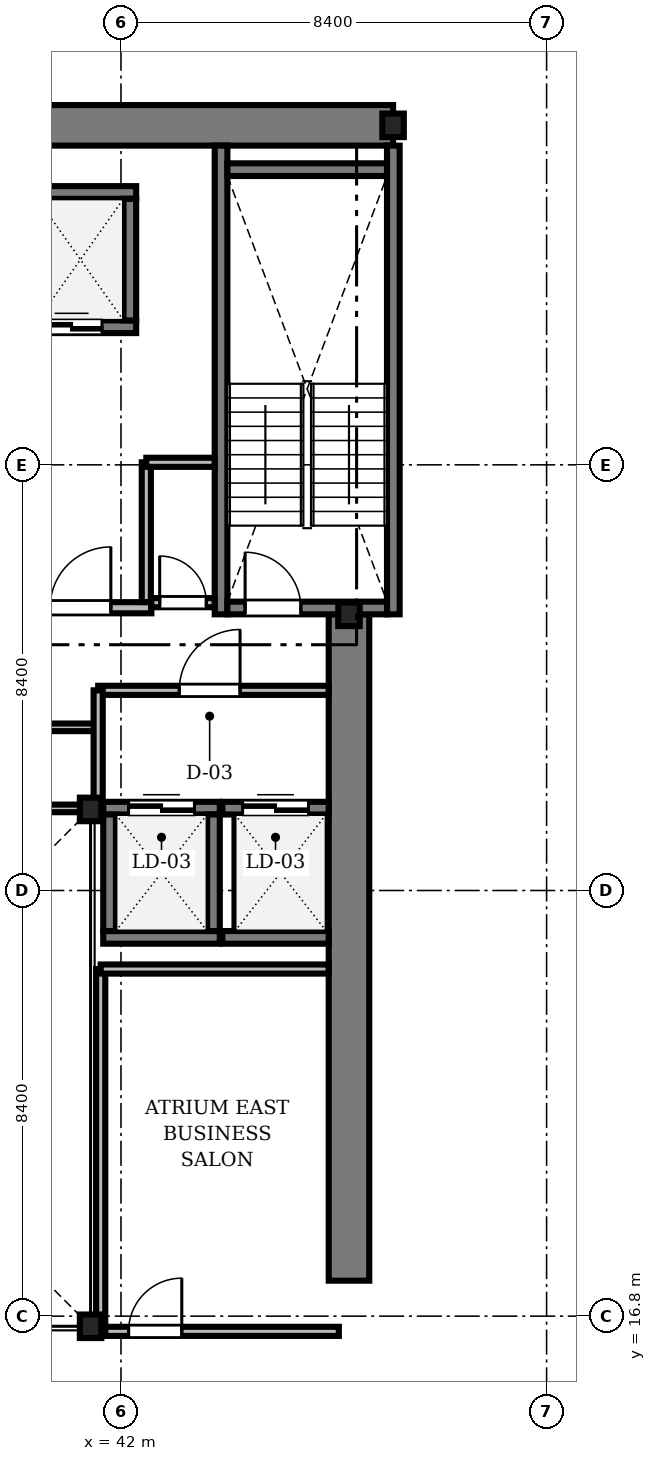
"""IFC4 building model, lengths in metres.
Left out: names, types, materials, properties, quantities, classifications, styles, units other than length and angle.
Written with IfcOpenShell. Run it as: python <this file> out.ifc"""

import sys

from ifc_helpers import new_model, si_unit, direction, frame, frame_2d, origin, origin_2d, place, context, subcontext, project, spatial, rectangle, i_section, extrude, source, transform, mapped, element, fill, save


model = new_model("IFC4")
c1 = context("Model", 3, precision=1e-05, world=origin(), true_north=direction((0.0, 1.0)))
c2 = subcontext(c1, "Body", "Model", "MODEL_VIEW")
j1 = project(units=[si_unit("LENGTHUNIT", "METRE"), si_unit("PLANEANGLEUNIT", "RADIAN")], contexts=[c1])
p1 = place(None, origin())
s1 = spatial("IfcSite", under=j1, at=p1, CompositionType="ELEMENT")
p2 = place(p1, origin())
s2 = spatial("IfcBuilding", under=s1, at=p2, CompositionType="ELEMENT")
p3 = place(p2, frame((0.0, 0.0, 140.9)))
s3 = spatial("IfcBuildingStorey", under=s2, at=p3, CompositionType="ELEMENT", Elevation=140.9)
m1 = source(origin(), c2, "Body", "SweptSolid", [
    extrude(rectangle(XDim=17.52, YDim=0.8, at=frame_2d((8.76, 0.0))), origin(), (0.0, 0.0, 1.0), 3.46),
])
p4 = place(p3, frame((29.85, 40.3, 0.0), z_axis=(0.0, 0.0, 1.0), x_axis=(1.0, 0.0, 0.0)))
e1 = element("IfcWall", 1, at=p4, inside=s3, PredefinedType="SHEAR", context=c2, shape_type="MappedRepresentation", body=[
    mapped(m1, transform((0.0, 0.0, 0.0), scale=1.0)),
])
m2 = source(origin(), c2, "Body", "SweptSolid", [
    extrude(rectangle(XDim=13.15, YDim=0.8, at=frame_2d((6.575, 0.0))), origin(), (0.0, 0.0, 1.0), 3.46),
])
p5 = place(p3, frame((46.5, 17.5, 0.0), z_axis=(0.0, 0.0, 1.0), x_axis=(0.0, 1.0, 0.0)))
e2 = element("IfcWall", 2, at=p5, inside=s3, PredefinedType="SHEAR", context=c2, shape_type="MappedRepresentation", body=[
    mapped(m2, transform((0.0, 0.0, 0.0), scale=1.0)),
])
m3 = source(origin(), c2, "Body", "SweptSolid", [
    extrude(i_section(OverallWidth=0.424, OverallDepth=0.465, WebThickness=0.035, FlangeThickness=0.056, FilletRadius=0.015, at=origin_2d()), origin(), (0.0, 0.0, 1.0), 3.46),
])
for number, where, z_axis, x_axis in (
    (3, (41.4, 16.6, 0.0), (0.0, 0.0, 1.0), (1.0, 0.0, 0.0)),
    (4, (41.4, 26.8, 0.0), (0.0, 0.0, 1.0), (1.0, 0.0, 0.0)),
    (5, (46.5, 30.65, 0.0), (0.0, 0.0, 1.0), (1.0, 0.0, 0.0)),
    (6, (47.37, 40.3, 0.0), (0.0, 0.0, 1.0), (1.0, 0.0, 0.0)),
):
    element("IfcColumn", number, at=place(p3, frame(where, z_axis=z_axis, x_axis=x_axis)), inside=s3, PredefinedType="COLUMN", context=c2, shape_type="MappedRepresentation", body=[
        mapped(m3, transform((0.0, 0.0, 0.0), scale=1.0)),
    ])
m4 = source(origin(), c2, "Body", "SweptSolid", [
    extrude(rectangle(XDim=9.25, YDim=0.25, at=frame_2d((4.625, 0.0))), origin(), (0.0, 0.0, 1.0), 3.5),
])
for number, where, z_axis, x_axis in (
    (7, (43.975, 30.65, 0.0), (0.0, 0.0, 1.0), (0.0, 1.0, 0.0)),
    (8, (47.375, 30.65, 0.0), (0.0, 0.0, 1.0), (0.0, 1.0, 0.0)),
):
    element("IfcWall", number, at=place(p3, frame(where, z_axis=z_axis, x_axis=x_axis)), inside=s3, PredefinedType="SOLIDWALL", context=c2, shape_type="MappedRepresentation", body=[
        mapped(m4, transform((0.0, 0.0, 0.0), scale=1.0)),
    ])
m5 = source(origin(), c2, "Body", "SweptSolid", [
    extrude(rectangle(XDim=3.15, YDim=0.25, at=frame_2d((1.575, 0.0))), origin(), (0.0, 0.0, 1.0), 3.5),
])
p6 = place(p3, frame((44.1, 39.425, 0.0), z_axis=(0.0, 0.0, 1.0), x_axis=(1.0, 0.0, 0.0)))
e9 = element("IfcWall", 9, at=p6, inside=s3, PredefinedType="SOLIDWALL", context=c2, shape_type="MappedRepresentation", body=[
    mapped(m5, transform((0.0, 0.0, 0.0), scale=1.0)),
])
p7 = place(p3, frame((44.1, 30.775, 0.0), z_axis=(0.0, 0.0, 1.0), x_axis=(1.0, 0.0, 0.0)))
e10 = element("IfcWall", 10, at=p7, inside=s3, PredefinedType="SOLIDWALL", context=c2, shape_type="MappedRepresentation", body=[
    mapped(m5, transform((0.0, 0.0, 0.0), scale=1.0)),
])
m6 = source(origin(), c2, "Body", "SweptSolid", [
    extrude(rectangle(XDim=1.1, YDim=2.2, at=frame_2d((0.55, 1.1))), frame((0.0, 0.135, 0.0), z_axis=(0.0, -1.0, 0.0), x_axis=(1.0, 0.0, 0.0)), (0.0, 0.0, 1.0), 0.27),
])
p8 = place(p7, frame((0.35, 0.0, 0.0)))
e11 = element("IfcOpeningElement", 11, at=p8, cuts=e10, PredefinedType="OPENING", context=c2, shape_type="MappedRepresentation", body=[
    mapped(m6, transform((0.0, 0.0, 0.0), scale=1.0)),
])
m7 = source(origin(), c2, "Body", "SweptSolid", [
    extrude(rectangle(XDim=2.8, YDim=0.22, at=frame_2d((1.4, 0.0))), origin(), (0.0, 0.0, 1.0), 3.46),
])
p9 = place(p3, frame((39.8, 30.78, 0.0), z_axis=(0.0, 0.0, 1.0), x_axis=(1.0, 0.0, 0.0)))
e12 = element("IfcWall", 12, at=p9, inside=s3, PredefinedType="SOLIDWALL", context=c2, shape_type="MappedRepresentation", body=[
    mapped(m7, transform((0.0, 0.0, 0.0), scale=1.0)),
])
m8 = source(origin(), c2, "Body", "SweptSolid", [
    extrude(rectangle(XDim=1.2, YDim=2.2, at=frame_2d((0.6, 1.1))), frame((0.0, 0.12, 0.0), z_axis=(0.0, -1.0, 0.0), x_axis=(1.0, 0.0, 0.0)), (0.0, 0.0, 1.0), 0.24),
])
p10 = place(p9, frame((0.8, 0.0, 0.0)))
e13 = element("IfcOpeningElement", 13, at=p10, cuts=e12, PredefinedType="OPENING", context=c2, shape_type="MappedRepresentation", body=[
    mapped(m8, transform((0.0, 0.0, 0.0), scale=1.0)),
])
m9 = source(origin(), c2, "Body", "SweptSolid", [
    extrude(rectangle(XDim=2.55, YDim=0.25, at=frame_2d((1.275, 0.0))), origin(), (0.0, 0.0, 1.0), 3.46),
])
p11 = place(p3, frame((39.75, 36.325, 0.0), z_axis=(0.0, 0.0, 1.0), x_axis=(1.0, 0.0, 0.0)))
e14 = element("IfcWall", 14, at=p11, inside=s3, PredefinedType="SOLIDWALL", context=c2, shape_type="MappedRepresentation", body=[
    mapped(m9, transform((0.0, 0.0, 0.0), scale=1.0)),
])
m10 = source(origin(), c2, "Body", "SweptSolid", [
    extrude(rectangle(XDim=1.2, YDim=2.25, at=frame_2d((0.6, 1.125))), frame((0.0, 0.135, 0.0), z_axis=(0.0, -1.0, 0.0), x_axis=(1.0, 0.0, 0.0)), (0.0, 0.0, 1.0), 0.27),
])
p12 = place(p11, frame((0.675, 0.0, 0.0)))
e15 = element("IfcOpeningElement", 15, at=p12, cuts=e14, PredefinedType="OPENING", context=c2, shape_type="MappedRepresentation", body=[
    mapped(m10, transform((0.0, 0.0, 0.0), scale=1.0)),
])
p13 = place(p3, frame((39.75, 38.975, 0.0), z_axis=(0.0, 0.0, 1.0), x_axis=(1.0, 0.0, 0.0)))
e16 = element("IfcWall", 16, at=p13, inside=s3, PredefinedType="SOLIDWALL", context=c2, shape_type="MappedRepresentation", body=[
    mapped(m9, transform((0.0, 0.0, 0.0), scale=1.0)),
])
m11 = source(origin(), c2, "Body", "SweptSolid", [
    extrude(rectangle(XDim=2.4, YDim=0.25, at=frame_2d((1.2, 0.0))), origin(), (0.0, 0.0, 1.0), 3.46),
])
p14 = place(p3, frame((42.175, 36.45, 0.0), z_axis=(0.0, 0.0, 1.0), x_axis=(0.0, 1.0, 0.0)))
e17 = element("IfcWall", 17, at=p14, inside=s3, PredefinedType="SOLIDWALL", context=c2, shape_type="MappedRepresentation", body=[
    mapped(m11, transform((0.0, 0.0, 0.0), scale=1.0)),
])
m12 = source(origin(), c2, "Body", "SweptSolid", [
    extrude(rectangle(XDim=2.3, YDim=0.25, at=frame_2d((1.15, 0.0))), origin(), (0.0, 0.0, 1.0), 3.46),
])
p15 = place(p3, frame((41.65, 24.275, 0.0), z_axis=(0.0, 0.0, 1.0), x_axis=(1.0, 0.0, 0.0)))
e18 = element("IfcWall", 18, at=p15, inside=s3, PredefinedType="SOLIDWALL", context=c2, shape_type="MappedRepresentation", body=[
    mapped(m12, transform((0.0, 0.0, 0.0), scale=1.0)),
])
p16 = place(p3, frame((41.65, 26.825, 0.0), z_axis=(0.0, 0.0, 1.0), x_axis=(1.0, 0.0, 0.0)))
e19 = element("IfcWall", 19, at=p16, inside=s3, PredefinedType="SOLIDWALL", context=c2, shape_type="MappedRepresentation", body=[
    mapped(m12, transform((0.0, 0.0, 0.0), scale=1.0)),
])
m13 = source(origin(), c2, "Body", "SweptSolid", [
    extrude(rectangle(XDim=1.3, YDim=2.3, at=frame_2d((0.65, 1.15))), frame((0.0, 0.135, 0.0), z_axis=(0.0, -1.0, 0.0), x_axis=(1.0, 0.0, 0.0)), (0.0, 0.0, 1.0), 0.27),
])
p17 = place(p16, frame((0.5, 0.0, 0.0)))
e20 = element("IfcOpeningElement", 20, at=p17, cuts=e19, PredefinedType="OPENING", context=c2, shape_type="MappedRepresentation", body=[
    mapped(m13, transform((0.0, 0.0, 0.0), scale=1.0)),
])
for number, where, z_axis, x_axis in (
    (21, (41.775, 24.4, 0.0), (0.0, 0.0, 1.0), (0.0, 1.0, 0.0)),
    (22, (43.825, 24.4, 0.0), (0.0, 0.0, 1.0), (0.0, 1.0, 0.0)),
):
    element("IfcWall", number, at=place(p3, frame(where, z_axis=z_axis, x_axis=x_axis)), inside=s3, PredefinedType="SOLIDWALL", context=c2, shape_type="MappedRepresentation", body=[
        mapped(m12, transform((0.0, 0.0, 0.0), scale=1.0)),
    ])
m14 = source(origin(), c2, "Body", "SweptSolid", [
    extrude(rectangle(XDim=2.1, YDim=0.25, at=frame_2d((1.05, 0.0))), origin(), (0.0, 0.0, 1.0), 3.46),
])
p18 = place(p3, frame((44.0, 24.275, 0.0), z_axis=(0.0, 0.0, 1.0), x_axis=(1.0, 0.0, 0.0)))
e23 = element("IfcWall", 23, at=p18, inside=s3, PredefinedType="SOLIDWALL", context=c2, shape_type="MappedRepresentation", body=[
    mapped(m14, transform((0.0, 0.0, 0.0), scale=1.0)),
])
p19 = place(p3, frame((44.0, 26.825, 0.0), z_axis=(0.0, 0.0, 1.0), x_axis=(1.0, 0.0, 0.0)))
e24 = element("IfcWall", 24, at=p19, inside=s3, PredefinedType="SOLIDWALL", context=c2, shape_type="MappedRepresentation", body=[
    mapped(m14, transform((0.0, 0.0, 0.0), scale=1.0)),
])
p20 = place(p19, frame((0.4, 0.0, 0.0)))
e25 = element("IfcOpeningElement", 25, at=p20, cuts=e24, PredefinedType="OPENING", context=c2, shape_type="MappedRepresentation", body=[
    mapped(m13, transform((0.0, 0.0, 0.0), scale=1.0)),
])
m15 = source(origin(), c2, "Body", "SweptSolid", [
    extrude(rectangle(XDim=4.548, YDim=0.18, at=frame_2d((2.274, 0.0))), origin(), (0.0, 0.0, 1.0), 3.092),
])
p21 = place(p3, frame((41.55, 29.15, 0.0), z_axis=(0.0, 0.0, 1.0), x_axis=(1.0, 0.0, 0.0)))
e26 = element("IfcWall", 26, at=p21, inside=s3, PredefinedType="PARTITIONING", context=c2, shape_type="MappedRepresentation", body=[
    mapped(m15, transform((0.0, 0.0, 0.0), scale=1.0)),
])
m16 = source(origin(), c2, "Body", "SweptSolid", [
    extrude(rectangle(XDim=1.2, YDim=2.2, at=frame_2d((0.6, 1.1))), frame((0.0, 0.1, 0.0), z_axis=(0.0, -1.0, 0.0), x_axis=(1.0, 0.0, 0.0)), (0.0, 0.0, 1.0), 0.2),
])
p22 = place(p21, frame((1.6, 0.0, 0.0)))
e27 = element("IfcOpeningElement", 27, at=p22, cuts=e26, PredefinedType="OPENING", context=c2, shape_type="MappedRepresentation", body=[
    mapped(m16, transform((0.0, 0.0, 0.0), scale=1.0)),
])
m17 = source(origin(), c2, "Body", "SweptSolid", [
    extrude(rectangle(XDim=4.7, YDim=0.18, at=frame_2d((2.35, 0.0))), origin(), (0.0, 0.0, 1.0), 2.852),
])
p23 = place(p3, frame((41.6, 16.5, 0.0), z_axis=(0.0, 0.0, 1.0), x_axis=(1.0, 0.0, 0.0)))
e28 = element("IfcWall", 28, at=p23, inside=s3, PredefinedType="PARTITIONING", context=c2, shape_type="MappedRepresentation", body=[
    mapped(m17, transform((0.0, 0.0, 0.0), scale=1.0)),
])
m18 = source(origin(), c2, "Body", "SweptSolid", [
    extrude(rectangle(XDim=1.05, YDim=2.2, at=frame_2d((0.525, 1.1))), frame((0.0, 0.1, 0.0), z_axis=(0.0, -1.0, 0.0), x_axis=(1.0, 0.0, 0.0)), (0.0, 0.0, 1.0), 0.2),
])
p24 = place(p23, frame((0.55, 0.0, 0.0)))
e29 = element("IfcOpeningElement", 29, at=p24, cuts=e28, PredefinedType="OPENING", context=c2, shape_type="MappedRepresentation", body=[
    mapped(m18, transform((0.0, 0.0, 0.0), scale=1.0)),
])
m19 = source(origin(), c2, "Body", "SweptSolid", [
    extrude(rectangle(XDim=2.74, YDim=0.15, at=frame_2d((1.37, 0.0))), origin(), (0.0, 0.0, 1.0), 3.46),
])
p25 = place(p3, frame((38.78, 28.42, 0.0), z_axis=(0.0, 0.0, 1.0), x_axis=(1.0, 0.0, 0.0)))
e30 = element("IfcWall", 30, at=p25, inside=s3, PredefinedType="PARTITIONING", context=c2, shape_type="MappedRepresentation", body=[
    mapped(m19, transform((0.0, 0.0, 0.0), scale=1.0)),
])
m20 = source(origin(), c2, "Body", "SweptSolid", [
    extrude(rectangle(XDim=0.92, YDim=2.1, at=frame_2d((0.46, 1.05))), frame((0.0, 0.085, 0.0), z_axis=(0.0, -1.0, 0.0), x_axis=(1.0, 0.0, 0.0)), (0.0, 0.0, 1.0), 0.17),
])
p26 = place(p25, frame((0.63, 0.0, 0.0)))
e31 = element("IfcOpeningElement", 31, at=p26, cuts=e30, PredefinedType="OPENING", context=c2, shape_type="MappedRepresentation", body=[
    mapped(m20, transform((0.0, 0.0, 0.0), scale=1.0)),
])
m21 = source(origin(), c2, "Body", "SweptSolid", [
    extrude(rectangle(XDim=1.248, YDim=0.18, at=frame_2d((0.624, 0.0))), origin(), (0.0, 0.0, 1.0), 3.46),
])
p27 = place(p3, frame((42.6, 30.88, 0.0), z_axis=(0.0, 0.0, 1.0), x_axis=(1.0, 0.0, 0.0)))
e32 = element("IfcWall", 32, at=p27, inside=s3, PredefinedType="PARTITIONING", context=c2, shape_type="MappedRepresentation", body=[
    mapped(m21, transform((0.0, 0.0, 0.0), scale=1.0)),
])
m22 = source(origin(), c2, "Body", "SweptSolid", [
    extrude(rectangle(XDim=0.92, YDim=2.1, at=frame_2d((0.46, 1.05))), frame((0.0, 0.1, 0.0), z_axis=(0.0, -1.0, 0.0), x_axis=(1.0, 0.0, 0.0)), (0.0, 0.0, 1.0), 0.2),
])
p28 = place(p27, frame((0.164, 0.0, 0.0)))
e33 = element("IfcOpeningElement", 33, at=p28, cuts=e32, PredefinedType="OPENING", context=c2, shape_type="MappedRepresentation", body=[
    mapped(m22, transform((0.0, 0.0, 0.0), scale=1.0)),
])
m23 = source(origin(), c2, "Body", "SweptSolid", [
    extrude(rectangle(XDim=7.15, YDim=0.18, at=frame_2d((3.575, 0.0))), origin(), (0.0, 0.0, 1.0), 2.852),
])
p29 = place(p3, frame((41.6, 16.5, 0.0), z_axis=(0.0, 0.0, 1.0), x_axis=(0.0, 1.0, 0.0)))
e34 = element("IfcWall", 34, at=p29, inside=s3, PredefinedType="PARTITIONING", context=c2, shape_type="MappedRepresentation", body=[
    mapped(m23, transform((0.0, 0.0, 0.0), scale=1.0)),
])
m24 = source(origin(), c2, "Body", "SweptSolid", [
    extrude(rectangle(XDim=4.498, YDim=0.18, at=frame_2d((2.249, 0.0))), origin(), (0.0, 0.0, 1.0), 3.46),
])
p30 = place(p3, frame((41.6, 23.65, 0.0), z_axis=(0.0, 0.0, 1.0), x_axis=(1.0, 0.0, 0.0)))
e35 = element("IfcWall", 35, at=p30, inside=s3, PredefinedType="PARTITIONING", context=c2, shape_type="MappedRepresentation", body=[
    mapped(m24, transform((0.0, 0.0, 0.0), scale=1.0)),
])
m25 = source(origin(), c2, "Body", "SweptSolid", [
    extrude(rectangle(XDim=2.758, YDim=0.18, at=frame_2d((1.379, 0.0))), origin(), (0.0, 0.0, 1.0), 3.46),
])
p31 = place(p3, frame((42.5, 30.892, 0.0), z_axis=(0.0, 0.0, 1.0), x_axis=(0.0, 1.0, 0.0)))
e36 = element("IfcWall", 36, at=p31, inside=s3, PredefinedType="PARTITIONING", context=c2, shape_type="MappedRepresentation", body=[
    mapped(m25, transform((0.0, 0.0, 0.0), scale=1.0)),
])
m26 = source(origin(), c2, "Body", "SweptSolid", [
    extrude(rectangle(XDim=2.74, YDim=0.15, at=frame_2d((1.37, 0.0))), origin(), (0.0, 0.0, 1.0), 2.852),
])
p32 = place(p3, frame((38.78, 26.82, 0.0), z_axis=(0.0, 0.0, 1.0), x_axis=(1.0, 0.0, 0.0)))
e37 = element("IfcWall", 37, at=p32, inside=s3, PredefinedType="PARTITIONING", context=c2, shape_type="MappedRepresentation", body=[
    mapped(m26, transform((0.0, 0.0, 0.0), scale=1.0)),
])
m27 = source(origin(), c2, "Body", "SweptSolid", [
    extrude(rectangle(XDim=2.35, YDim=0.18, at=frame_2d((1.175, 0.0))), origin(), (0.0, 0.0, 1.0), 2.852),
])
p33 = place(p3, frame((41.55, 26.8, 0.0), z_axis=(0.0, 0.0, 1.0), x_axis=(0.0, 1.0, 0.0)))
e38 = element("IfcWall", 38, at=p33, inside=s3, PredefinedType="PARTITIONING", context=c2, shape_type="MappedRepresentation", body=[
    mapped(m27, transform((0.0, 0.0, 0.0), scale=1.0)),
])
m28 = source(origin(), c2, "Body", "SweptSolid", [
    extrude(rectangle(XDim=1.348, YDim=0.18, at=frame_2d((0.674, 0.0))), origin(), (0.0, 0.0, 1.0), 3.46),
])
p34 = place(p3, frame((42.5, 33.65, 0.0), z_axis=(0.0, 0.0, 1.0), x_axis=(1.0, 0.0, 0.0)))
e39 = element("IfcWall", 39, at=p34, inside=s3, PredefinedType="PARTITIONING", context=c2, shape_type="MappedRepresentation", body=[
    mapped(m28, transform((0.0, 0.0, 0.0), scale=1.0)),
])
m29 = source(origin(), c2, "Body", "SweptSolid", [
    extrude(rectangle(XDim=1.1, YDim=2.2, at=frame_2d((0.55, 1.1))), frame((0.0, 0.025, 0.0), z_axis=(0.0, -1.0, 0.0), x_axis=(1.0, 0.0, 0.0)), (0.0, 0.0, 1.0), 0.05),
])
p35 = place(p8, origin())
e40 = element("IfcDoor", 40, at=p35, inside=s3, OperationType="SINGLE_SWING_LEFT", PredefinedType="DOOR", context=c2, shape_type="MappedRepresentation", body=[
    mapped(m29, transform((0.0, 0.0, 0.0), scale=1.0)),
])
fill(e11, e40)
m30 = source(origin(), c2, "Body", "SweptSolid", [
    extrude(rectangle(XDim=1.2, YDim=2.2, at=frame_2d((0.6, 1.1))), frame((0.0, 0.025, 0.0), z_axis=(0.0, -1.0, 0.0), x_axis=(1.0, 0.0, 0.0)), (0.0, 0.0, 1.0), 0.05),
])
p36 = place(p10, origin())
e41 = element("IfcDoor", 41, at=p36, inside=s3, OperationType="SINGLE_SWING_RIGHT", PredefinedType="DOOR", context=c2, shape_type="MappedRepresentation", body=[
    mapped(m30, transform((0.0, 0.0, 0.0), scale=1.0)),
])
fill(e13, e41)
m31 = source(origin(), c2, "Body", "SweptSolid", [
    extrude(rectangle(XDim=1.2, YDim=2.25, at=frame_2d((0.6, 1.125))), frame((0.0, 0.025, 0.0), z_axis=(0.0, -1.0, 0.0), x_axis=(1.0, 0.0, 0.0)), (0.0, 0.0, 1.0), 0.05),
])
p37 = place(p12, origin())
e42 = element("IfcDoor", 42, at=p37, inside=s3, OperationType="DOUBLE_DOOR_SLIDING", PredefinedType="DOOR", context=c2, shape_type="MappedRepresentation", body=[
    mapped(m31, transform((0.0, 0.0, 0.0), scale=1.0)),
])
fill(e15, e42)
m32 = source(origin(), c2, "Body", "SweptSolid", [
    extrude(rectangle(XDim=1.3, YDim=2.3, at=frame_2d((0.65, 1.15))), frame((0.0, 0.025, 0.0), z_axis=(0.0, -1.0, 0.0), x_axis=(1.0, 0.0, 0.0)), (0.0, 0.0, 1.0), 0.05),
])
p38 = place(p17, origin())
e43 = element("IfcDoor", 43, at=p38, inside=s3, OperationType="DOUBLE_DOOR_SLIDING", PredefinedType="DOOR", context=c2, shape_type="MappedRepresentation", body=[
    mapped(m32, transform((0.0, 0.0, 0.0), scale=1.0)),
])
fill(e20, e43)
p39 = place(p20, origin())
e44 = element("IfcDoor", 44, at=p39, inside=s3, OperationType="DOUBLE_DOOR_SLIDING", PredefinedType="DOOR", context=c2, shape_type="MappedRepresentation", body=[
    mapped(m32, transform((0.0, 0.0, 0.0), scale=1.0)),
])
fill(e25, e44)
p40 = place(p22, origin())
e45 = element("IfcDoor", 45, at=p40, inside=s3, OperationType="SINGLE_SWING_RIGHT", PredefinedType="DOOR", context=c2, shape_type="MappedRepresentation", body=[
    mapped(m30, transform((0.0, 0.0, 0.0), scale=1.0)),
])
fill(e27, e45)
m33 = source(origin(), c2, "Body", "SweptSolid", [
    extrude(rectangle(XDim=1.05, YDim=2.2, at=frame_2d((0.525, 1.1))), frame((0.0, 0.025, 0.0), z_axis=(0.0, -1.0, 0.0), x_axis=(1.0, 0.0, 0.0)), (0.0, 0.0, 1.0), 0.05),
])
p41 = place(p24, origin())
e46 = element("IfcDoor", 46, at=p41, inside=s3, OperationType="SINGLE_SWING_RIGHT", PredefinedType="DOOR", context=c2, shape_type="MappedRepresentation", body=[
    mapped(m33, transform((0.0, 0.0, 0.0), scale=1.0)),
])
fill(e29, e46)
m34 = source(origin(), c2, "Body", "SweptSolid", [
    extrude(rectangle(XDim=0.92, YDim=2.1, at=frame_2d((0.46, 1.05))), frame((0.0, 0.025, 0.0), z_axis=(0.0, -1.0, 0.0), x_axis=(1.0, 0.0, 0.0)), (0.0, 0.0, 1.0), 0.05),
])
p42 = place(p28, origin())
e47 = element("IfcDoor", 47, at=p42, inside=s3, OperationType="SINGLE_SWING_LEFT", PredefinedType="DOOR", context=c2, shape_type="MappedRepresentation", body=[
    mapped(m34, transform((0.0, 0.0, 0.0), scale=1.0)),
])
fill(e33, e47)
save(model, sys.argv[1])
